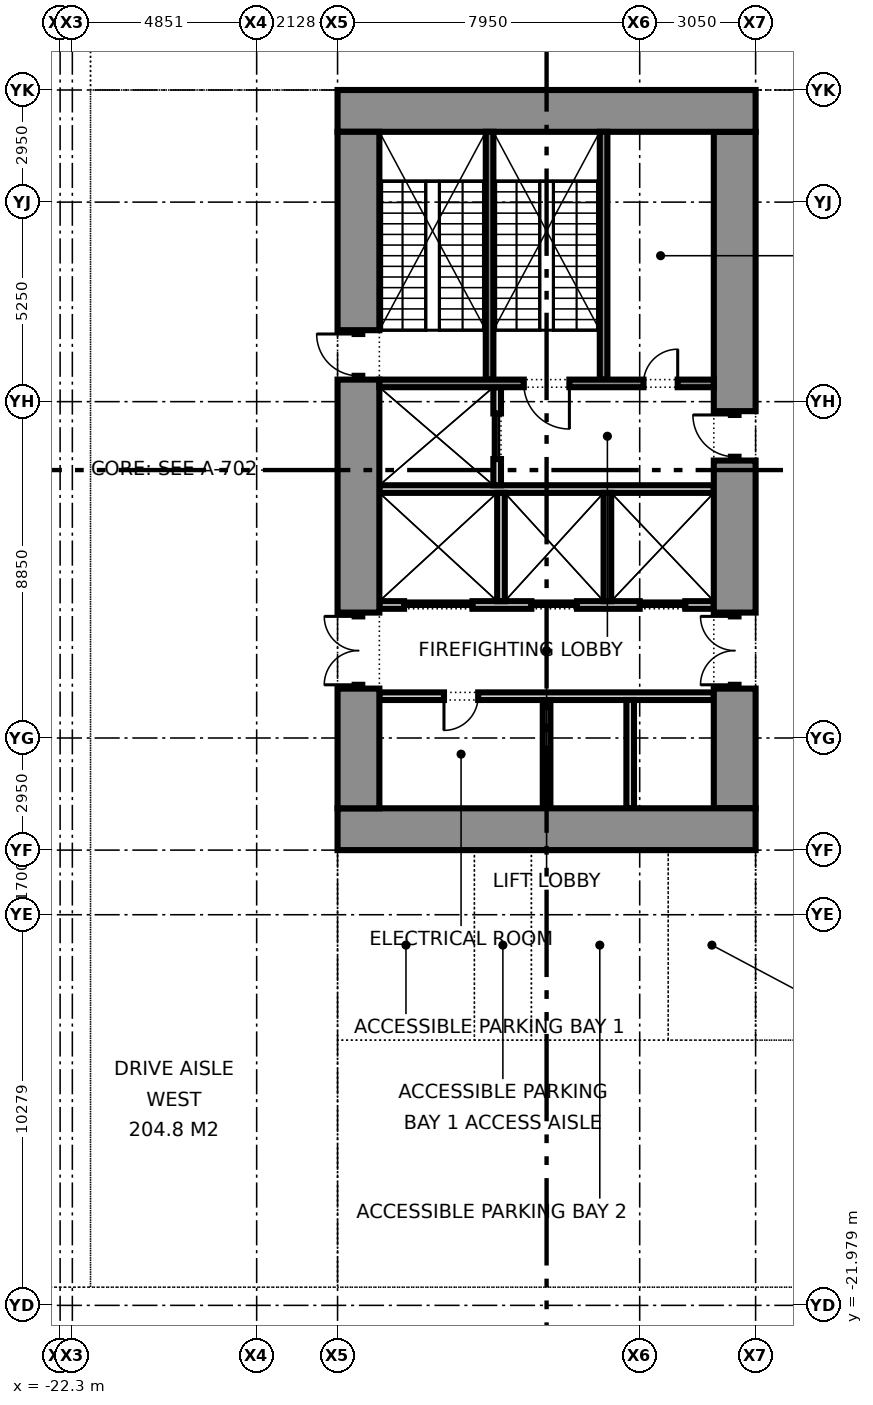
"""IFC4 building model, lengths in metres.
Left out: names, types, materials, properties, quantities, classifications, styles, units other than length and angle.
Written with IfcOpenShell. Run it as: python <this file> out.ifc"""

import sys

from ifc_helpers import new_model, si_unit, direction, frame, frame_2d, origin, place, context, subcontext, project, spatial, rectangle, extrude, element, fill, save


model = new_model("IFC4")
c1 = context("Model", 3, precision=1e-05, world=origin(), true_north=direction((0.0, 1.0)))
c2 = subcontext(c1, "Body", "Model", "MODEL_VIEW")
j1 = project(units=[si_unit("LENGTHUNIT", "METRE"), si_unit("PLANEANGLEUNIT", "RADIAN")], contexts=[c1])
p1 = place(None, origin())
s1 = spatial("IfcSite", under=j1, at=p1, CompositionType="ELEMENT")
p2 = place(p1, origin())
s2 = spatial("IfcBuilding", under=s1, at=p2, CompositionType="ELEMENT")
p3 = place(p2, frame((0.0, 0.0, -5.0)))
s3 = spatial("IfcBuildingStorey", under=s2, at=p3, CompositionType="ELEMENT", Elevation=-5.0)
p4 = place(p3, frame((-27.0, -21.979, 0.0), z_axis=(0.0, 0.0, 1.0), x_axis=(0.707106781187, -0.707106781187, 0.0)))
e1 = element("IfcWall", 1, at=p4, inside=s3, PredefinedType="SOLIDWALL", context=c2, shape_type="SweptSolid", body=[
    extrude(rectangle(XDim=7.102, YDim=0.6, at=frame_2d((3.551, 0.0))), origin(), (0.0, 0.0, 1.0), 5.0),
])
for number, where, z_axis, x_axis in (
    (2, (-15.0, -9.45, 0.0), (0.0, 0.0, 1.0), (1.0, 0.0, 0.0)),
    (3, (-15.0, 9.45, 0.0), (0.0, 0.0, 1.0), (1.0, 0.0, 0.0)),
):
    element("IfcWall", number, at=place(p3, frame(where, z_axis=z_axis, x_axis=x_axis)), inside=s3, PredefinedType="SHEAR", context=c2, shape_type="SweptSolid", body=[
        extrude(rectangle(XDim=11.0, YDim=1.1, at=frame_2d((5.5, 0.0))), origin(), (0.0, 0.0, 1.0), 4.7),
    ])
p5 = place(p3, frame((-14.45, -8.9, 0.0), z_axis=(0.0, 0.0, 1.0), x_axis=(0.0, 1.0, 0.0)))
e4 = element("IfcWall", 4, at=p5, inside=s3, PredefinedType="SHEAR", context=c2, shape_type="SweptSolid", body=[
    extrude(rectangle(XDim=3.15, YDim=1.1, at=frame_2d((1.575, 0.0))), origin(), (0.0, 0.0, 1.0), 4.7),
])
p6 = place(p3, frame((-14.45, -5.75, 0.0), z_axis=(0.0, 0.0, 1.0), x_axis=(0.0, 1.0, 0.0)))
e5 = element("IfcWall", 5, at=p6, inside=s3, PredefinedType="PARTITIONING", context=c2, shape_type="SweptSolid", body=[
    extrude(rectangle(XDim=2.0, YDim=0.2, at=frame_2d((1.0, 0.0))), origin(), (0.0, 0.0, 1.0), 2.4),
])
p7 = place(p6, frame((0.1, 0.0, 0.0)))
e6 = element("IfcOpeningElement", 6, at=p7, cuts=e5, PredefinedType="OPENING", context=c2, shape_type="SweptSolid", body=[
    extrude(rectangle(XDim=1.8, YDim=2.1, at=frame_2d((0.9, 1.05))), frame((0.0, 0.11, 0.0), z_axis=(0.0, -1.0, 0.0), x_axis=(1.0, 0.0, 0.0)), (0.0, 0.0, 1.0), 0.22),
])
p8 = place(p3, frame((-14.45, -3.75, 0.0), z_axis=(0.0, 0.0, 1.0), x_axis=(0.0, 1.0, 0.0)))
e7 = element("IfcWall", 7, at=p8, inside=s3, PredefinedType="SHEAR", context=c2, shape_type="SweptSolid", body=[
    extrude(rectangle(XDim=6.13, YDim=1.1, at=frame_2d((3.065, 0.0))), origin(), (0.0, 0.0, 1.0), 4.7),
])
p9 = place(p3, frame((-14.45, 2.38, 0.0), z_axis=(0.0, 0.0, 1.0), x_axis=(0.0, 1.0, 0.0)))
e8 = element("IfcWall", 8, at=p9, inside=s3, PredefinedType="SHEAR", context=c2, shape_type="SweptSolid", body=[
    extrude(rectangle(XDim=1.3, YDim=0.2, at=frame_2d((0.65, 0.0))), origin(), (0.0, 0.0, 1.0), 2.4),
])
p10 = place(p9, frame((0.1, 0.0, 0.0)))
e9 = element("IfcOpeningElement", 9, at=p10, cuts=e8, PredefinedType="OPENING", context=c2, shape_type="SweptSolid", body=[
    extrude(rectangle(XDim=1.1, YDim=2.1, at=frame_2d((0.55, 1.05))), frame((0.0, 0.11, 0.0), z_axis=(0.0, -1.0, 0.0), x_axis=(1.0, 0.0, 0.0)), (0.0, 0.0, 1.0), 0.22),
])
p11 = place(p3, frame((-14.45, 3.68, 0.0), z_axis=(0.0, 0.0, 1.0), x_axis=(0.0, 1.0, 0.0)))
e10 = element("IfcWall", 10, at=p11, inside=s3, PredefinedType="SHEAR", context=c2, shape_type="SweptSolid", body=[
    extrude(rectangle(XDim=5.22, YDim=1.1, at=frame_2d((2.61, 0.0))), origin(), (0.0, 0.0, 1.0), 4.7),
])
p12 = place(p3, frame((-4.55, -8.9, 0.0), z_axis=(0.0, 0.0, 1.0), x_axis=(0.0, 1.0, 0.0)))
e11 = element("IfcWall", 11, at=p12, inside=s3, PredefinedType="SHEAR", context=c2, shape_type="SweptSolid", body=[
    extrude(rectangle(XDim=3.15, YDim=1.1, at=frame_2d((1.575, 0.0))), origin(), (0.0, 0.0, 1.0), 4.7),
])
p13 = place(p3, frame((-4.55, -5.75, 0.0), z_axis=(0.0, 0.0, 1.0), x_axis=(0.0, 1.0, 0.0)))
e12 = element("IfcWall", 12, at=p13, inside=s3, PredefinedType="PARTITIONING", context=c2, shape_type="SweptSolid", body=[
    extrude(rectangle(XDim=2.0, YDim=0.2, at=frame_2d((1.0, 0.0))), origin(), (0.0, 0.0, 1.0), 2.4),
])
p14 = place(p13, frame((0.1, 0.0, 0.0)))
e13 = element("IfcOpeningElement", 13, at=p14, cuts=e12, PredefinedType="OPENING", context=c2, shape_type="SweptSolid", body=[
    extrude(rectangle(XDim=1.8, YDim=2.1, at=frame_2d((0.9, 1.05))), frame((0.0, 0.11, 0.0), z_axis=(0.0, -1.0, 0.0), x_axis=(1.0, 0.0, 0.0)), (0.0, 0.0, 1.0), 0.22),
])
p15 = place(p3, frame((-4.55, -3.75, 0.0), z_axis=(0.0, 0.0, 1.0), x_axis=(0.0, 1.0, 0.0)))
e14 = element("IfcWall", 14, at=p15, inside=s3, PredefinedType="SHEAR", context=c2, shape_type="SweptSolid", body=[
    extrude(rectangle(XDim=4.0, YDim=1.1, at=frame_2d((2.0, 0.0))), origin(), (0.0, 0.0, 1.0), 4.7),
])
p16 = place(p3, frame((-4.55, 0.25, 0.0), z_axis=(0.0, 0.0, 1.0), x_axis=(0.0, 1.0, 0.0)))
e15 = element("IfcWall", 15, at=p16, inside=s3, PredefinedType="PARTITIONING", context=c2, shape_type="SweptSolid", body=[
    extrude(rectangle(XDim=1.3, YDim=0.2, at=frame_2d((0.65, 0.0))), origin(), (0.0, 0.0, 1.0), 2.4),
])
p17 = place(p16, frame((0.1, 0.0, 0.0)))
e16 = element("IfcOpeningElement", 16, at=p17, cuts=e15, PredefinedType="OPENING", context=c2, shape_type="SweptSolid", body=[
    extrude(rectangle(XDim=1.1, YDim=2.1, at=frame_2d((0.55, 1.05))), frame((0.0, 0.11, 0.0), z_axis=(0.0, -1.0, 0.0), x_axis=(1.0, 0.0, 0.0)), (0.0, 0.0, 1.0), 0.22),
])
p18 = place(p3, frame((-4.55, 1.55, 0.0), z_axis=(0.0, 0.0, 1.0), x_axis=(0.0, 1.0, 0.0)))
e17 = element("IfcWall", 17, at=p18, inside=s3, PredefinedType="SHEAR", context=c2, shape_type="SweptSolid", body=[
    extrude(rectangle(XDim=7.35, YDim=1.1, at=frame_2d((3.675, 0.0))), origin(), (0.0, 0.0, 1.0), 4.7),
])
p19 = place(p3, frame((-13.9, -5.95, 0.0), z_axis=(0.0, 0.0, 1.0), x_axis=(1.0, 0.0, 0.0)))
e18 = element("IfcWall", 18, at=p19, inside=s3, PredefinedType="PARTITIONING", context=c2, shape_type="SweptSolid", body=[
    extrude(rectangle(XDim=8.8, YDim=0.2, at=frame_2d((4.4, 0.0))), origin(), (0.0, 0.0, 1.0), 4.7),
])
p20 = place(p19, frame((1.7, 0.0, 0.0)))
e19 = element("IfcOpeningElement", 19, at=p20, cuts=e18, PredefinedType="OPENING", context=c2, shape_type="SweptSolid", body=[
    extrude(rectangle(XDim=0.9, YDim=2.1, at=frame_2d((0.45, 1.05))), frame((0.0, 0.11, 0.0), z_axis=(0.0, -1.0, 0.0), x_axis=(1.0, 0.0, 0.0)), (0.0, 0.0, 1.0), 0.22),
])
p21 = place(p3, frame((-13.9, -3.55, 0.0), z_axis=(0.0, 0.0, 1.0), x_axis=(1.0, 0.0, 0.0)))
e20 = element("IfcWall", 20, at=p21, inside=s3, PredefinedType="PARTITIONING", context=c2, shape_type="SweptSolid", body=[
    extrude(rectangle(XDim=8.8, YDim=0.2, at=frame_2d((4.4, 0.0))), origin(), (0.0, 0.0, 1.0), 4.7),
])
p22 = place(p21, frame((0.65, 0.0, 0.0)))
e21 = element("IfcOpeningElement", 21, at=p22, cuts=e20, PredefinedType="OPENING", context=c2, shape_type="SweptSolid", body=[
    extrude(rectangle(XDim=1.8, YDim=2.1, at=frame_2d((0.9, 1.05))), frame((0.0, 0.11, 0.0), z_axis=(0.0, -1.0, 0.0), x_axis=(1.0, 0.0, 0.0)), (0.0, 0.0, 1.0), 0.22),
])
p23 = place(p21, frame((4.0, 0.0, 0.0)))
e22 = element("IfcOpeningElement", 22, at=p23, cuts=e20, PredefinedType="OPENING", context=c2, shape_type="SweptSolid", body=[
    extrude(rectangle(XDim=1.2, YDim=2.1, at=frame_2d((0.6, 1.05))), frame((0.0, 0.11, 0.0), z_axis=(0.0, -1.0, 0.0), x_axis=(1.0, 0.0, 0.0)), (0.0, 0.0, 1.0), 0.22),
])
p24 = place(p21, frame((6.85, 0.0, 0.0)))
e23 = element("IfcOpeningElement", 23, at=p24, cuts=e20, PredefinedType="OPENING", context=c2, shape_type="SweptSolid", body=[
    extrude(rectangle(XDim=1.2, YDim=2.1, at=frame_2d((0.6, 1.05))), frame((0.0, 0.11, 0.0), z_axis=(0.0, -1.0, 0.0), x_axis=(1.0, 0.0, 0.0)), (0.0, 0.0, 1.0), 0.22),
])
p25 = place(p3, frame((-13.9, -0.5, 0.0), z_axis=(0.0, 0.0, 1.0), x_axis=(1.0, 0.0, 0.0)))
e24 = element("IfcWall", 24, at=p25, inside=s3, PredefinedType="PARTITIONING", context=c2, shape_type="SweptSolid", body=[
    extrude(rectangle(XDim=8.8, YDim=0.2, at=frame_2d((4.4, 0.0))), origin(), (0.0, 0.0, 1.0), 4.7),
])
p26 = place(p3, frame((-10.8, -0.4, 0.0), z_axis=(0.0, 0.0, 1.0), x_axis=(0.0, 1.0, 0.0)))
e25 = element("IfcWall", 25, at=p26, inside=s3, PredefinedType="PARTITIONING", context=c2, shape_type="SweptSolid", body=[
    extrude(rectangle(XDim=2.58, YDim=0.2, at=frame_2d((1.29, 0.0))), origin(), (0.0, 0.0, 1.0), 4.7),
])
p27 = place(p26, frame((0.69, 0.0, 0.0)))
e26 = element("IfcOpeningElement", 26, at=p27, cuts=e25, PredefinedType="OPENING", context=c2, shape_type="SweptSolid", body=[
    extrude(rectangle(XDim=1.2, YDim=2.1, at=frame_2d((0.6, 1.05))), frame((0.0, 0.11, 0.0), z_axis=(0.0, -1.0, 0.0), x_axis=(1.0, 0.0, 0.0)), (0.0, 0.0, 1.0), 0.22),
])
p28 = place(p3, frame((-13.9, 2.28, 0.0), z_axis=(0.0, 0.0, 1.0), x_axis=(1.0, 0.0, 0.0)))
e27 = element("IfcWall", 27, at=p28, inside=s3, PredefinedType="SHEAR", context=c2, shape_type="SweptSolid", body=[
    extrude(rectangle(XDim=8.8, YDim=0.2, at=frame_2d((4.4, 0.0))), origin(), (0.0, 0.0, 1.0), 4.7),
])
p29 = place(p28, frame((3.8, 0.0, 0.0)))
e28 = element("IfcOpeningElement", 28, at=p29, cuts=e27, PredefinedType="OPENING", context=c2, shape_type="SweptSolid", body=[
    extrude(rectangle(XDim=1.2, YDim=2.1, at=frame_2d((0.6, 1.05))), frame((0.0, 0.11, 0.0), z_axis=(0.0, -1.0, 0.0), x_axis=(1.0, 0.0, 0.0)), (0.0, 0.0, 1.0), 0.22),
])
p30 = place(p28, frame((6.95, 0.0, 0.0)))
e29 = element("IfcOpeningElement", 29, at=p30, cuts=e27, PredefinedType="OPENING", context=c2, shape_type="SweptSolid", body=[
    extrude(rectangle(XDim=0.9, YDim=2.1, at=frame_2d((0.45, 1.05))), frame((0.0, 0.11, 0.0), z_axis=(0.0, -1.0, 0.0), x_axis=(1.0, 0.0, 0.0)), (0.0, 0.0, 1.0), 0.22),
])
for number, where, z_axis, x_axis in (
    (30, (-11.0, 2.38, 0.0), (0.0, 0.0, 1.0), (0.0, 1.0, 0.0)),
    (31, (-8.0, 2.38, 0.0), (0.0, 0.0, 1.0), (0.0, 1.0, 0.0)),
):
    element("IfcWall", number, at=place(p3, frame(where, z_axis=z_axis, x_axis=x_axis)), inside=s3, PredefinedType="SHEAR", context=c2, shape_type="SweptSolid", body=[
        extrude(rectangle(XDim=6.52, YDim=0.2, at=frame_2d((3.26, 0.0))), origin(), (0.0, 0.0, 1.0), 4.7),
    ])
for number, where, z_axis, x_axis in (
    (32, (-9.5, -8.9, 0.0), (0.0, 0.0, 1.0), (0.0, 1.0, 0.0)),
    (33, (-7.3, -8.9, 0.0), (0.0, 0.0, 1.0), (0.0, 1.0, 0.0)),
    (34, (-10.7, -3.45, 0.0), (0.0, 0.0, 1.0), (0.0, 1.0, 0.0)),
    (35, (-7.9, -3.45, 0.0), (0.0, 0.0, 1.0), (0.0, 1.0, 0.0)),
):
    element("IfcWall", number, at=place(p3, frame(where, z_axis=z_axis, x_axis=x_axis)), inside=s3, PredefinedType="PARTITIONING", context=c2, shape_type="SweptSolid", body=[
        extrude(rectangle(XDim=2.85, YDim=0.2, at=frame_2d((1.425, 0.0))), origin(), (0.0, 0.0, 1.0), 4.7),
    ])
p31 = place(p7, origin())
e36 = element("IfcDoor", 36, at=p31, inside=s3, OperationType="DOUBLE_DOOR_SINGLE_SWING", PredefinedType="DOOR", context=c2, shape_type="SweptSolid", body=[
    extrude(rectangle(XDim=1.8, YDim=2.1, at=frame_2d((0.9, 1.05))), frame((0.0, 0.025, 0.0), z_axis=(0.0, -1.0, 0.0), x_axis=(1.0, 0.0, 0.0)), (0.0, 0.0, 1.0), 0.05),
])
fill(e6, e36)
p32 = place(p10, origin())
e37 = element("IfcDoor", 37, at=p32, inside=s3, OperationType="SINGLE_SWING_RIGHT", PredefinedType="DOOR", context=c2, shape_type="SweptSolid", body=[
    extrude(rectangle(XDim=1.1, YDim=2.1, at=frame_2d((0.55, 1.05))), frame((0.0, 0.025, 0.0), z_axis=(0.0, -1.0, 0.0), x_axis=(1.0, 0.0, 0.0)), (0.0, 0.0, 1.0), 0.05),
])
fill(e9, e37)
p33 = place(p14, origin())
e38 = element("IfcDoor", 38, at=p33, inside=s3, OperationType="DOUBLE_DOOR_SINGLE_SWING", PredefinedType="DOOR", context=c2, shape_type="SweptSolid", body=[
    extrude(rectangle(XDim=1.8, YDim=2.1, at=frame_2d((0.9, 1.05))), frame((0.0, 0.025, 0.0), z_axis=(0.0, -1.0, 0.0), x_axis=(1.0, 0.0, 0.0)), (0.0, 0.0, 1.0), 0.05),
])
fill(e13, e38)
p34 = place(p17, origin())
e39 = element("IfcDoor", 39, at=p34, inside=s3, OperationType="SINGLE_SWING_RIGHT", PredefinedType="DOOR", context=c2, shape_type="SweptSolid", body=[
    extrude(rectangle(XDim=1.1, YDim=2.1, at=frame_2d((0.55, 1.05))), frame((0.0, 0.025, 0.0), z_axis=(0.0, -1.0, 0.0), x_axis=(1.0, 0.0, 0.0)), (0.0, 0.0, 1.0), 0.05),
])
fill(e16, e39)
p35 = place(p22, origin())
e40 = element("IfcDoor", 40, at=p35, inside=s3, OperationType="DOUBLE_DOOR_SLIDING", PredefinedType="DOOR", context=c2, shape_type="SweptSolid", body=[
    extrude(rectangle(XDim=1.8, YDim=2.1, at=frame_2d((0.9, 1.05))), frame((0.0, 0.025, 0.0), z_axis=(0.0, -1.0, 0.0), x_axis=(1.0, 0.0, 0.0)), (0.0, 0.0, 1.0), 0.05),
])
fill(e21, e40)
p36 = place(p23, origin())
e41 = element("IfcDoor", 41, at=p36, inside=s3, OperationType="DOUBLE_DOOR_SLIDING", PredefinedType="DOOR", context=c2, shape_type="SweptSolid", body=[
    extrude(rectangle(XDim=1.2, YDim=2.1, at=frame_2d((0.6, 1.05))), frame((0.0, 0.025, 0.0), z_axis=(0.0, -1.0, 0.0), x_axis=(1.0, 0.0, 0.0)), (0.0, 0.0, 1.0), 0.05),
])
fill(e22, e41)
p37 = place(p24, origin())
e42 = element("IfcDoor", 42, at=p37, inside=s3, OperationType="DOUBLE_DOOR_SLIDING", PredefinedType="DOOR", context=c2, shape_type="SweptSolid", body=[
    extrude(rectangle(XDim=1.2, YDim=2.1, at=frame_2d((0.6, 1.05))), frame((0.0, 0.025, 0.0), z_axis=(0.0, -1.0, 0.0), x_axis=(1.0, 0.0, 0.0)), (0.0, 0.0, 1.0), 0.05),
])
fill(e23, e42)
p38 = place(p27, origin())
e43 = element("IfcDoor", 43, at=p38, inside=s3, OperationType="DOUBLE_DOOR_SLIDING", PredefinedType="DOOR", context=c2, shape_type="SweptSolid", body=[
    extrude(rectangle(XDim=1.2, YDim=2.1, at=frame_2d((0.6, 1.05))), frame((0.0, 0.025, 0.0), z_axis=(0.0, -1.0, 0.0), x_axis=(1.0, 0.0, 0.0)), (0.0, 0.0, 1.0), 0.05),
])
fill(e26, e43)
p39 = place(p20, frame((0.9, 0.0, 0.0), z_axis=(0.0, 0.0, 1.0), x_axis=(-1.0, 0.0, 0.0)))
e44 = element("IfcDoor", 44, at=p39, inside=s3, OperationType="SINGLE_SWING_RIGHT", PredefinedType="DOOR", context=c2, shape_type="SweptSolid", body=[
    extrude(rectangle(XDim=0.9, YDim=2.1, at=frame_2d((0.45, 1.05))), frame((0.0, 0.025, 0.0), z_axis=(0.0, -1.0, 0.0), x_axis=(1.0, 0.0, 0.0)), (0.0, 0.0, 1.0), 0.05),
])
fill(e19, e44)
p40 = place(p29, frame((1.2, 0.0, 0.0), z_axis=(0.0, 0.0, 1.0), x_axis=(-1.0, 0.0, 0.0)))
e45 = element("IfcDoor", 45, at=p40, inside=s3, OperationType="SINGLE_SWING_LEFT", PredefinedType="DOOR", context=c2, shape_type="SweptSolid", body=[
    extrude(rectangle(XDim=1.2, YDim=2.1, at=frame_2d((0.6, 1.05))), frame((0.0, 0.025, 0.0), z_axis=(0.0, -1.0, 0.0), x_axis=(1.0, 0.0, 0.0)), (0.0, 0.0, 1.0), 0.05),
])
fill(e28, e45)
p41 = place(p30, origin())
e46 = element("IfcDoor", 46, at=p41, inside=s3, OperationType="SINGLE_SWING_RIGHT", PredefinedType="DOOR", context=c2, shape_type="SweptSolid", body=[
    extrude(rectangle(XDim=0.9, YDim=2.1, at=frame_2d((0.45, 1.05))), frame((0.0, 0.025, 0.0), z_axis=(0.0, -1.0, 0.0), x_axis=(1.0, 0.0, 0.0)), (0.0, 0.0, 1.0), 0.05),
])
fill(e29, e46)
save(model, sys.argv[1])
